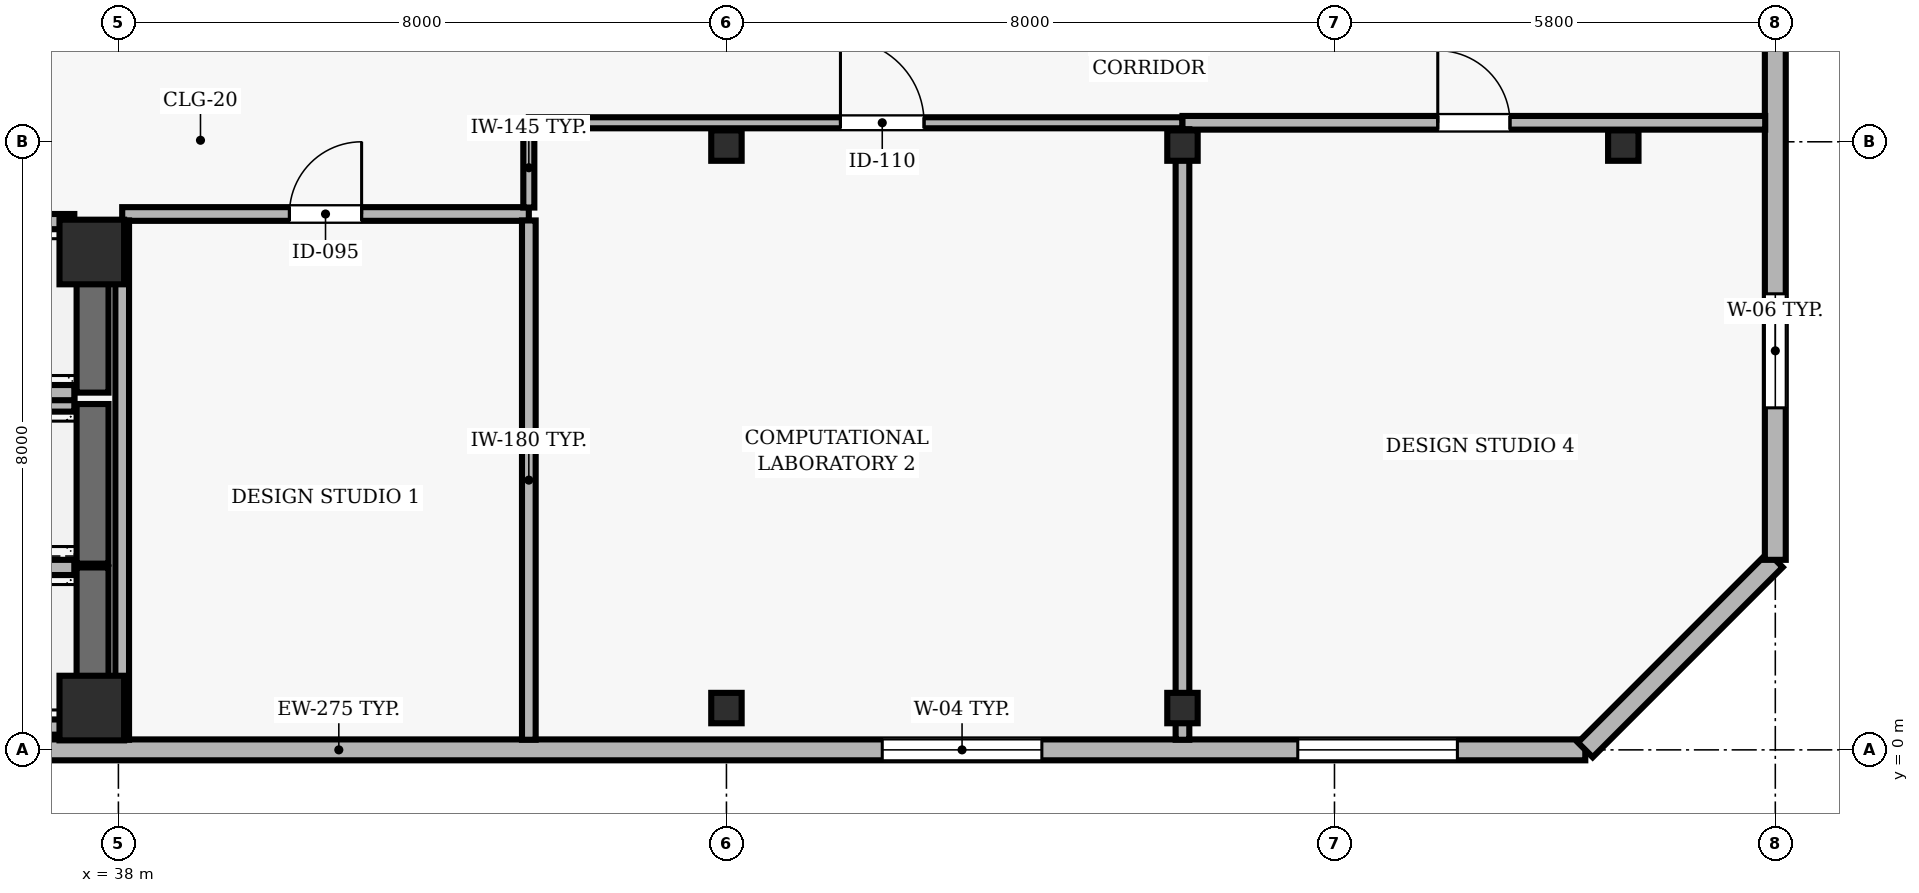
"""IFC4 building model, lengths in metres.
Left out: names, types, materials, properties, quantities, classifications, styles, units other than length and angle.
Written with IfcOpenShell. Run it as: python <this file> out.ifc"""

import sys

from ifc_helpers import new_model, si_unit, direction, frame, frame_2d, origin, origin_2d, place, context, subcontext, project, spatial, rectangle, hollow_rectangle, extrude, element, fill, save


model = new_model("IFC4")
c1 = context("Model", 3, precision=1e-05, world=origin(), true_north=direction((0.0, 1.0)))
c2 = subcontext(c1, "Body", "Model", "MODEL_VIEW")
j1 = project(units=[si_unit("LENGTHUNIT", "METRE"), si_unit("PLANEANGLEUNIT", "RADIAN")], contexts=[c1])
p1 = place(None, origin())
s1 = spatial("IfcSite", under=j1, at=p1, CompositionType="ELEMENT")
p2 = place(p1, origin())
s2 = spatial("IfcBuilding", under=s1, at=p2, CompositionType="ELEMENT")
p3 = place(p2, frame((0.0, 0.0, 259.9)))
s3 = spatial("IfcBuildingStorey", under=s2, at=p3, CompositionType="ELEMENT", Elevation=259.9)
for number, where, z_axis, x_axis in (
    (1, (37.65, 0.55, 0.0), (0.0, 0.0, 1.0), (1.0, 0.0, 0.0)),
    (2, (37.65, 6.55, 0.0), (0.0, 0.0, 1.0), (1.0, 0.0, 0.0)),
):
    element("IfcColumn", number, at=place(p3, frame(where, z_axis=z_axis, x_axis=x_axis)), inside=s3, PredefinedType="COLUMN", context=c2, shape_type="SweptSolid", body=[
        extrude(rectangle(XDim=0.85, YDim=0.85, at=origin_2d()), origin(), (0.0, 0.0, 1.0), 3.9),
    ])
for number, where, z_axis, x_axis in (
    (3, (46.0, 0.55, 0.0), (0.0, 0.0, 1.0), (1.0, 0.0, 0.0)),
    (4, (46.0, 7.95, 0.0), (0.0, 0.0, 1.0), (1.0, 0.0, 0.0)),
    (5, (52.0, 0.55, 0.0), (0.0, 0.0, 1.0), (1.0, 0.0, 0.0)),
    (6, (52.0, 7.95, 0.0), (0.0, 0.0, 1.0), (1.0, 0.0, 0.0)),
    (7, (57.8, 7.95, 0.0), (0.0, 0.0, 1.0), (1.0, 0.0, 0.0)),
):
    element("IfcColumn", number, at=place(p3, frame(where, z_axis=z_axis, x_axis=x_axis)), inside=s3, PredefinedType="COLUMN", context=c2, shape_type="SweptSolid", body=[
        extrude(hollow_rectangle(XDim=0.4, YDim=0.4, WallThickness=0.02, at=origin_2d()), origin(), (0.0, 0.0, 1.0), 3.9),
    ])
p4 = place(p3, frame((24.5, 0.0, 0.0), z_axis=(0.0, 0.0, 1.0), x_axis=(1.0, 0.0, 0.0)))
e8 = element("IfcWall", 8, at=p4, inside=s3, PredefinedType="SOLIDWALL", context=c2, shape_type="SweptSolid", body=[
    extrude(rectangle(XDim=32.8, YDim=0.275, at=frame_2d((16.4, 0.0))), origin(), (0.0, 0.0, 1.0), 3.69),
])
p5 = place(p4, frame((1.683, 0.0, 0.9)))
e9 = element("IfcOpeningElement", 9, at=p5, cuts=e8, PredefinedType="OPENING", context=c2, shape_type="SweptSolid", body=[
    extrude(rectangle(XDim=2.1, YDim=1.6, at=frame_2d((1.05, 0.8))), frame((0.0, 0.147, 0.0), z_axis=(0.0, -1.0, 0.0), x_axis=(1.0, 0.0, 0.0)), (0.0, 0.0, 1.0), 0.295),
])
p6 = place(p4, frame((23.55, 0.0, 0.9)))
e10 = element("IfcOpeningElement", 10, at=p6, cuts=e8, PredefinedType="OPENING", context=c2, shape_type="SweptSolid", body=[
    extrude(rectangle(XDim=2.1, YDim=1.6, at=frame_2d((1.05, 0.8))), frame((0.0, 0.147, 0.0), z_axis=(0.0, -1.0, 0.0), x_axis=(1.0, 0.0, 0.0)), (0.0, 0.0, 1.0), 0.295),
])
p7 = place(p4, frame((29.017, 0.0, 0.9)))
e11 = element("IfcOpeningElement", 11, at=p7, cuts=e8, PredefinedType="OPENING", context=c2, shape_type="SweptSolid", body=[
    extrude(rectangle(XDim=2.1, YDim=1.6, at=frame_2d((1.05, 0.8))), frame((0.0, 0.147, 0.0), z_axis=(0.0, -1.0, 0.0), x_axis=(1.0, 0.0, 0.0)), (0.0, 0.0, 1.0), 0.295),
])
p8 = place(p3, frame((57.3, 0.0, 0.0), z_axis=(0.0, 0.0, 1.0), x_axis=(0.707106781187, 0.707106781187, 0.0)))
e12 = element("IfcWall", 12, at=p8, inside=s3, PredefinedType="SOLIDWALL", context=c2, shape_type="SweptSolid", body=[
    extrude(rectangle(XDim=3.536, YDim=0.275, at=frame_2d((1.768, 0.0))), origin(), (0.0, 0.0, 1.0), 3.69),
])
p9 = place(p3, frame((59.8, 2.5, 0.0), z_axis=(0.0, 0.0, 1.0), x_axis=(0.0, 1.0, 0.0)))
e13 = element("IfcWall", 13, at=p9, inside=s3, PredefinedType="SOLIDWALL", context=c2, shape_type="SweptSolid", body=[
    extrude(rectangle(XDim=11.0, YDim=0.275, at=frame_2d((5.5, 0.0))), origin(), (0.0, 0.0, 1.0), 3.69),
])
p10 = place(p9, frame((2.0, 0.0, 0.9)))
e14 = element("IfcOpeningElement", 14, at=p10, cuts=e13, PredefinedType="OPENING", context=c2, shape_type="SweptSolid", body=[
    extrude(rectangle(XDim=1.5, YDim=1.8, at=frame_2d((0.75, 0.9))), frame((0.0, 0.147, 0.0), z_axis=(0.0, -1.0, 0.0), x_axis=(1.0, 0.0, 0.0)), (0.0, 0.0, 1.0), 0.295),
])
p11 = place(p9, frame((8.4, 0.0, 0.9)))
e15 = element("IfcOpeningElement", 15, at=p11, cuts=e13, PredefinedType="OPENING", context=c2, shape_type="SweptSolid", body=[
    extrude(rectangle(XDim=1.5, YDim=1.8, at=frame_2d((0.75, 0.9))), frame((0.0, 0.147, 0.0), z_axis=(0.0, -1.0, 0.0), x_axis=(1.0, 0.0, 0.0)), (0.0, 0.0, 1.0), 0.295),
])
p12 = place(p3, frame((37.66, 0.3, 0.0), z_axis=(0.0, 0.0, 1.0), x_axis=(0.0, 1.0, 0.0)))
e16 = element("IfcWall", 16, at=p12, inside=s3, PredefinedType="SHEAR", context=c2, shape_type="SweptSolid", body=[
    extrude(rectangle(XDim=2.1, YDim=0.42, at=frame_2d((1.05, 0.0))), origin(), (0.0, 0.0, 1.0), 3.69),
])
for number, where, z_axis, x_axis in (
    (17, (35.28, 0.3, 0.0), (0.0, 0.0, 1.0), (1.0, 0.0, 0.0)),
    (18, (37.42, 2.4, 0.0), (0.0, 0.0, 1.0), (-1.0, 0.0, 0.0)),
):
    element("IfcWall", number, at=place(p3, frame(where, z_axis=z_axis, x_axis=x_axis)), inside=s3, PredefinedType="SOLIDWALL", context=c2, shape_type="SweptSolid", body=[
        extrude(rectangle(XDim=2.14, YDim=0.2, at=frame_2d((1.07, 0.0))), origin(), (0.0, 0.0, 1.0), 3.69),
    ])
p13 = place(p3, frame((37.66, 2.45, 0.0), z_axis=(0.0, 0.0, 1.0), x_axis=(0.0, 1.0, 0.0)))
e19 = element("IfcWall", 19, at=p13, inside=s3, PredefinedType="SHEAR", context=c2, shape_type="SweptSolid", body=[
    extrude(rectangle(XDim=2.1, YDim=0.42, at=frame_2d((1.05, 0.0))), origin(), (0.0, 0.0, 1.0), 3.69),
])
p14 = place(p3, frame((37.42, 4.55, 0.0), z_axis=(0.0, 0.0, 1.0), x_axis=(-1.0, 0.0, 0.0)))
e20 = element("IfcWall", 20, at=p14, inside=s3, PredefinedType="SOLIDWALL", context=c2, shape_type="SweptSolid", body=[
    extrude(rectangle(XDim=2.14, YDim=0.2, at=frame_2d((1.07, 0.0))), origin(), (0.0, 0.0, 1.0), 3.69),
])
p15 = place(p3, frame((37.66, 4.7, 0.0), z_axis=(0.0, 0.0, 1.0), x_axis=(0.0, 1.0, 0.0)))
e21 = element("IfcWall", 21, at=p15, inside=s3, PredefinedType="SHEAR", context=c2, shape_type="SweptSolid", body=[
    extrude(rectangle(XDim=2.25, YDim=0.42, at=frame_2d((1.125, 0.0))), origin(), (0.0, 0.0, 1.0), 3.69),
])
for number, where, z_axis, x_axis in (
    (22, (35.28, 4.7, 0.0), (0.0, 0.0, 1.0), (1.0, 0.0, 0.0)),
    (23, (37.42, 6.95, 0.0), (0.0, 0.0, 1.0), (-1.0, 0.0, 0.0)),
):
    element("IfcWall", number, at=place(p3, frame(where, z_axis=z_axis, x_axis=x_axis)), inside=s3, PredefinedType="SOLIDWALL", context=c2, shape_type="SweptSolid", body=[
        extrude(rectangle(XDim=2.14, YDim=0.2, at=frame_2d((1.07, 0.0))), origin(), (0.0, 0.0, 1.0), 3.69),
    ])
p16 = place(p3, frame((38.05, 7.05, 0.0), z_axis=(0.0, 0.0, 1.0), x_axis=(1.0, 0.0, 0.0)))
e24 = element("IfcWall", 24, at=p16, inside=s3, PredefinedType="PARTITIONING", context=c2, shape_type="SweptSolid", body=[
    extrude(rectangle(XDim=5.35, YDim=0.18, at=frame_2d((2.675, 0.0))), origin(), (0.0, 0.0, 1.0), 3.69),
])
p17 = place(p16, frame((2.2, 0.0, 0.0)))
e25 = element("IfcOpeningElement", 25, at=p17, cuts=e24, PredefinedType="OPENING", context=c2, shape_type="SweptSolid", body=[
    extrude(rectangle(XDim=0.95, YDim=2.1, at=frame_2d((0.475, 1.05))), frame((0.0, 0.1, 0.0), z_axis=(0.0, -1.0, 0.0), x_axis=(1.0, 0.0, 0.0)), (0.0, 0.0, 1.0), 0.2),
])
p18 = place(p3, frame((43.4, 8.25, 0.0), z_axis=(0.0, 0.0, 1.0), x_axis=(1.0, 0.0, 0.0)))
e26 = element("IfcWall", 26, at=p18, inside=s3, PredefinedType="PARTITIONING", context=c2, shape_type="SweptSolid", body=[
    extrude(rectangle(XDim=8.6, YDim=0.145, at=frame_2d((4.3, 0.0))), origin(), (0.0, 0.0, 1.0), 3.227),
])
p19 = place(p18, frame((4.1, 0.0, 0.0)))
e27 = element("IfcOpeningElement", 27, at=p19, cuts=e26, PredefinedType="OPENING", context=c2, shape_type="SweptSolid", body=[
    extrude(rectangle(XDim=1.1, YDim=2.15, at=frame_2d((0.55, 1.075))), frame((0.0, 0.083, 0.0), z_axis=(0.0, -1.0, 0.0), x_axis=(1.0, 0.0, 0.0)), (0.0, 0.0, 1.0), 0.165),
])
p20 = place(p3, frame((52.0, 8.25, 0.0), z_axis=(0.0, 0.0, 1.0), x_axis=(1.0, 0.0, 0.0)))
e28 = element("IfcWall", 28, at=p20, inside=s3, PredefinedType="PARTITIONING", context=c2, shape_type="SweptSolid", body=[
    extrude(rectangle(XDim=7.667, YDim=0.18, at=frame_2d((3.833, 0.0))), origin(), (0.0, 0.0, 1.0), 3.227),
])
p21 = place(p20, frame((3.359, 0.0, 0.0)))
e29 = element("IfcOpeningElement", 29, at=p21, cuts=e28, PredefinedType="OPENING", context=c2, shape_type="SweptSolid", body=[
    extrude(rectangle(XDim=0.95, YDim=2.1, at=frame_2d((0.475, 1.05))), frame((0.0, 0.1, 0.0), z_axis=(0.0, -1.0, 0.0), x_axis=(1.0, 0.0, 0.0)), (0.0, 0.0, 1.0), 0.2),
])
p22 = place(p3, frame((38.05, 6.965, 0.0), z_axis=(0.0, 0.0, 1.0), x_axis=(0.0, -1.0, 0.0)))
e30 = element("IfcWall", 30, at=p22, inside=s3, PredefinedType="PARTITIONING", context=c2, shape_type="SweptSolid", body=[
    extrude(rectangle(XDim=6.832, YDim=0.18, at=frame_2d((3.416, 0.0))), origin(), (0.0, 0.0, 1.0), 3.227),
])
p23 = place(p3, frame((43.4, 0.133, 0.0), z_axis=(0.0, 0.0, 1.0), x_axis=(0.0, 1.0, 0.0)))
e31 = element("IfcWall", 31, at=p23, inside=s3, PredefinedType="PARTITIONING", context=c2, shape_type="SweptSolid", body=[
    extrude(rectangle(XDim=6.832, YDim=0.18, at=frame_2d((3.416, 0.0))), origin(), (0.0, 0.0, 1.0), 3.69),
])
p24 = place(p3, frame((43.4, 7.135, 0.0), z_axis=(0.0, 0.0, 1.0), x_axis=(0.0, 1.0, 0.0)))
e32 = element("IfcWall", 32, at=p24, inside=s3, PredefinedType="PARTITIONING", context=c2, shape_type="SweptSolid", body=[
    extrude(rectangle(XDim=1.047, YDim=0.145, at=frame_2d((0.523, 0.0))), origin(), (0.0, 0.0, 1.0), 3.69),
])
p25 = place(p3, frame((52.0, 0.133, 0.0), z_axis=(0.0, 0.0, 1.0), x_axis=(0.0, 1.0, 0.0)))
e33 = element("IfcWall", 33, at=p25, inside=s3, PredefinedType="PARTITIONING", context=c2, shape_type="SweptSolid", body=[
    extrude(rectangle(XDim=8.032, YDim=0.18, at=frame_2d((4.016, 0.0))), origin(), (0.0, 0.0, 1.0), 3.227),
])
p26 = place(p6, origin())
e34 = element("IfcWindow", 34, at=p26, inside=s3, PartitioningType="SINGLE_PANEL", PredefinedType="WINDOW", context=c2, shape_type="SweptSolid", body=[
    extrude(rectangle(XDim=2.1, YDim=1.6, at=frame_2d((1.05, 0.8))), frame((0.0, 0.03, 0.0), z_axis=(0.0, -1.0, 0.0), x_axis=(1.0, 0.0, 0.0)), (0.0, 0.0, 1.0), 0.06),
])
fill(e10, e34)
p27 = place(p7, origin())
e35 = element("IfcWindow", 35, at=p27, inside=s3, PartitioningType="SINGLE_PANEL", PredefinedType="WINDOW", context=c2, shape_type="SweptSolid", body=[
    extrude(rectangle(XDim=2.1, YDim=1.6, at=frame_2d((1.05, 0.8))), frame((0.0, 0.03, 0.0), z_axis=(0.0, -1.0, 0.0), x_axis=(1.0, 0.0, 0.0)), (0.0, 0.0, 1.0), 0.06),
])
fill(e11, e35)
p28 = place(p10, origin())
e36 = element("IfcWindow", 36, at=p28, inside=s3, PartitioningType="SINGLE_PANEL", PredefinedType="WINDOW", context=c2, shape_type="SweptSolid", body=[
    extrude(rectangle(XDim=1.5, YDim=1.8, at=frame_2d((0.75, 0.9))), frame((0.0, 0.03, 0.0), z_axis=(0.0, -1.0, 0.0), x_axis=(1.0, 0.0, 0.0)), (0.0, 0.0, 1.0), 0.06),
])
fill(e14, e36)
p29 = place(p17, origin())
e37 = element("IfcDoor", 37, at=p29, inside=s3, OperationType="SINGLE_SWING_RIGHT", PredefinedType="DOOR", context=c2, shape_type="SweptSolid", body=[
    extrude(rectangle(XDim=0.95, YDim=2.1, at=frame_2d((0.475, 1.05))), frame((0.0, 0.025, 0.0), z_axis=(0.0, -1.0, 0.0), x_axis=(1.0, 0.0, 0.0)), (0.0, 0.0, 1.0), 0.05),
])
fill(e25, e37)
p30 = place(p19, origin())
e38 = element("IfcDoor", 38, at=p30, inside=s3, OperationType="SINGLE_SWING_LEFT", PredefinedType="DOOR", context=c2, shape_type="SweptSolid", body=[
    extrude(rectangle(XDim=1.1, YDim=2.15, at=frame_2d((0.55, 1.075))), frame((0.0, 0.025, 0.0), z_axis=(0.0, -1.0, 0.0), x_axis=(1.0, 0.0, 0.0)), (0.0, 0.0, 1.0), 0.05),
])
fill(e27, e38)
p31 = place(p21, origin())
e39 = element("IfcDoor", 39, at=p31, inside=s3, OperationType="SINGLE_SWING_LEFT", PredefinedType="DOOR", context=c2, shape_type="SweptSolid", body=[
    extrude(rectangle(XDim=0.95, YDim=2.1, at=frame_2d((0.475, 1.05))), frame((0.0, 0.025, 0.0), z_axis=(0.0, -1.0, 0.0), x_axis=(1.0, 0.0, 0.0)), (0.0, 0.0, 1.0), 0.05),
])
fill(e29, e39)
save(model, sys.argv[1])
